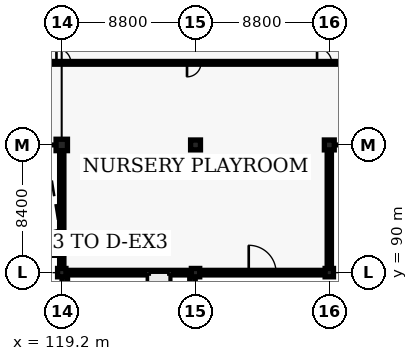
"""IFC4 building model, lengths in metres.
Left out: names, types, materials, properties, quantities, classifications, styles, units other than length and angle.
Written with IfcOpenShell. Run it as: python <this file> out.ifc"""

import sys

from ifc_helpers import new_model, si_unit, direction, frame, frame_2d, origin, origin_2d, place, context, subcontext, project, spatial, rectangle, circle, extrude, element, fill, save


model = new_model("IFC4")
c1 = context("Model", 3, precision=1e-05, world=origin(), true_north=direction((0.0, 1.0)))
c2 = subcontext(c1, "Body", "Model", "MODEL_VIEW")
j1 = project(units=[si_unit("LENGTHUNIT", "METRE"), si_unit("PLANEANGLEUNIT", "RADIAN")], contexts=[c1])
p1 = place(None, origin())
s1 = spatial("IfcSite", under=j1, at=p1, CompositionType="ELEMENT")
p2 = place(p1, origin())
s2 = spatial("IfcBuilding", under=s1, at=p2, CompositionType="ELEMENT")
p3 = place(p2, origin())
s3 = spatial("IfcBuildingStorey", under=s2, at=p3, CompositionType="ELEMENT", Elevation=0.0)
p4 = place(p3, frame((119.2, 90.0, 0.0), z_axis=(0.0, 0.0, 1.0), x_axis=(1.0, 0.0, 0.0)))
e1 = element("IfcColumn", 1, at=p4, inside=s3, PredefinedType="PILASTER", context=c2, shape_type="SweptSolid", body=[
    extrude(circle(Radius=0.275, at=origin_2d()), origin(), (0.0, 0.0, 1.0), 4.8),
])
p5 = place(p3, frame((119.2, 98.4, 0.0), z_axis=(0.0, 0.0, 1.0), x_axis=(1.0, 0.0, 0.0)))
e2 = element("IfcColumn", 2, at=p5, inside=s3, PredefinedType="COLUMN", context=c2, shape_type="SweptSolid", body=[
    extrude(rectangle(XDim=0.75, YDim=0.75, at=origin_2d()), origin(), (0.0, 0.0, 1.0), 4.8),
])
p6 = place(p3, frame((128.0, 90.0, 0.0), z_axis=(0.0, 0.0, 1.0), x_axis=(1.0, 0.0, 0.0)))
e3 = element("IfcColumn", 3, at=p6, inside=s3, PredefinedType="PILASTER", context=c2, shape_type="SweptSolid", body=[
    extrude(circle(Radius=0.275, at=origin_2d()), origin(), (0.0, 0.0, 1.0), 4.8),
])
p7 = place(p3, frame((128.0, 98.4, 0.0), z_axis=(0.0, 0.0, 1.0), x_axis=(1.0, 0.0, 0.0)))
e4 = element("IfcColumn", 4, at=p7, inside=s3, PredefinedType="COLUMN", context=c2, shape_type="SweptSolid", body=[
    extrude(rectangle(XDim=0.65, YDim=0.65, at=origin_2d()), origin(), (0.0, 0.0, 1.0), 4.8),
])
p8 = place(p3, frame((136.8, 90.0, 0.0), z_axis=(0.0, 0.0, 1.0), x_axis=(1.0, 0.0, 0.0)))
e5 = element("IfcColumn", 5, at=p8, inside=s3, PredefinedType="PILASTER", context=c2, shape_type="SweptSolid", body=[
    extrude(circle(Radius=0.275, at=origin_2d()), origin(), (0.0, 0.0, 1.0), 4.8),
])
p9 = place(p3, frame((136.8, 98.4, 0.0), z_axis=(0.0, 0.0, 1.0), x_axis=(1.0, 0.0, 0.0)))
e6 = element("IfcColumn", 6, at=p9, inside=s3, PredefinedType="COLUMN", context=c2, shape_type="SweptSolid", body=[
    extrude(rectangle(XDim=0.65, YDim=0.65, at=origin_2d()), origin(), (0.0, 0.0, 1.0), 4.8),
])
p10 = place(p3, frame((119.3, 90.0, 0.0), z_axis=(0.0, 0.0, 1.0), x_axis=(1.0, 0.0, 0.0)))
e7 = element("IfcWall", 7, at=p10, inside=s3, PredefinedType="SOLIDWALL", context=c2, shape_type="SweptSolid", body=[
    extrude(rectangle(XDim=8.6, YDim=0.3, at=frame_2d((4.3, 0.0))), origin(), (0.0, 0.0, 1.0), 3.675),
])
p11 = place(p3, frame((128.1, 90.0, 0.0), z_axis=(0.0, 0.0, 1.0), x_axis=(1.0, 0.0, 0.0)))
e8 = element("IfcWall", 8, at=p11, inside=s3, PredefinedType="SOLIDWALL", context=c2, shape_type="SweptSolid", body=[
    extrude(rectangle(XDim=8.6, YDim=0.3, at=frame_2d((4.3, 0.0))), origin(), (0.0, 0.0, 1.0), 3.675),
])
p12 = place(p11, frame((3.4, 0.0, 0.0)))
e9 = element("IfcOpeningElement", 9, at=p12, cuts=e8, PredefinedType="OPENING", context=c2, shape_type="SweptSolid", body=[
    extrude(rectangle(XDim=1.8, YDim=2.25, at=frame_2d((0.9, 1.125))), frame((0.0, 0.16, 0.0), z_axis=(0.0, -1.0, 0.0), x_axis=(1.0, 0.0, 0.0)), (0.0, 0.0, 1.0), 0.32),
])
p13 = place(p3, frame((119.2, 90.15, 0.0), z_axis=(0.0, 0.0, 1.0), x_axis=(0.0, 1.0, 0.0)))
e10 = element("IfcWall", 10, at=p13, inside=s3, PredefinedType="SOLIDWALL", context=c2, shape_type="SweptSolid", body=[
    extrude(rectangle(XDim=8.1, YDim=0.28, at=frame_2d((4.05, 0.0))), origin(), (0.0, 0.0, 1.0), 3.775),
])
p14 = place(p13, frame((0.9, 0.0, 0.0)))
e11 = element("IfcOpeningElement", 11, at=p14, cuts=e10, PredefinedType="OPENING", context=c2, shape_type="SweptSolid", body=[
    extrude(rectangle(XDim=1.8, YDim=2.25, at=frame_2d((0.9, 1.125))), frame((0.0, 0.15, 0.0), z_axis=(0.0, -1.0, 0.0), x_axis=(1.0, 0.0, 0.0)), (0.0, 0.0, 1.0), 0.3),
])
p15 = place(p3, frame((136.8, 90.15, 0.0), z_axis=(0.0, 0.0, 1.0), x_axis=(0.0, 1.0, 0.0)))
e12 = element("IfcWall", 12, at=p15, inside=s3, PredefinedType="SOLIDWALL", context=c2, shape_type="SweptSolid", body=[
    extrude(rectangle(XDim=8.1, YDim=0.28, at=frame_2d((4.05, 0.0))), origin(), (0.0, 0.0, 1.0), 3.775),
])
for number, where, z_axis, x_axis in (
    (13, (119.4, 88.85, 0.0), (0.0, 0.0, 1.0), (0.0, 1.0, 0.0)),
    (14, (127.8, 88.85, 0.0), (0.0, 0.0, 1.0), (0.0, 1.0, 0.0)),
):
    element("IfcWall", number, at=place(p3, frame(where, z_axis=z_axis, x_axis=x_axis)), inside=s3, PredefinedType="SOLIDWALL", context=c2, shape_type="SweptSolid", body=[
        extrude(rectangle(XDim=1.07, YDim=0.36, at=frame_2d((0.535, 0.0))), origin(), (0.0, 0.0, 1.0), 4.3),
    ])
p16 = place(p3, frame((42.15, 103.8, 0.0), z_axis=(0.0, 0.0, 1.0), x_axis=(1.0, 0.0, 0.0)))
e15 = element("IfcWall", 15, at=p16, inside=s3, PredefinedType="PARTITIONING", context=c2, shape_type="SweptSolid", body=[
    extrude(rectangle(XDim=102.9, YDim=0.18, at=frame_2d((51.45, 0.0))), origin(), (0.0, 0.0, 1.0), 3.775),
])
p17 = place(p16, frame((7.735, 0.0, 0.0)))
e16 = element("IfcOpeningElement", 16, at=p17, cuts=e15, PredefinedType="OPENING", context=c2, shape_type="SweptSolid", body=[
    extrude(rectangle(XDim=1.68, YDim=2.26, at=frame_2d((0.84, 1.13))), frame((0.0, 0.1, 0.0), z_axis=(0.0, -1.0, 0.0), x_axis=(1.0, 0.0, 0.0)), (0.0, 0.0, 1.0), 0.2),
])
p18 = place(p16, frame((16.63, 0.0, 0.0)))
e17 = element("IfcOpeningElement", 17, at=p18, cuts=e15, PredefinedType="OPENING", context=c2, shape_type="SweptSolid", body=[
    extrude(rectangle(XDim=1.04, YDim=2.08, at=frame_2d((0.52, 1.04))), frame((0.0, 0.1, 0.0), z_axis=(0.0, -1.0, 0.0), x_axis=(1.0, 0.0, 0.0)), (0.0, 0.0, 1.0), 0.2),
])
p19 = place(p16, frame((24.725, 0.0, 0.0)))
e18 = element("IfcOpeningElement", 18, at=p19, cuts=e15, PredefinedType="OPENING", context=c2, shape_type="SweptSolid", body=[
    extrude(rectangle(XDim=2.0, YDim=2.3, at=frame_2d((1.0, 1.15))), frame((0.0, 0.1, 0.0), z_axis=(0.0, -1.0, 0.0), x_axis=(1.0, 0.0, 0.0)), (0.0, 0.0, 1.0), 0.2),
])
p20 = place(p16, frame((33.375, 0.0, 0.0)))
e19 = element("IfcOpeningElement", 19, at=p20, cuts=e15, PredefinedType="OPENING", context=c2, shape_type="SweptSolid", body=[
    extrude(rectangle(XDim=1.85, YDim=2.22, at=frame_2d((0.925, 1.11))), frame((0.0, 0.1, 0.0), z_axis=(0.0, -1.0, 0.0), x_axis=(1.0, 0.0, 0.0)), (0.0, 0.0, 1.0), 0.2),
])
p21 = place(p16, frame((42.315, 0.0, 0.0)))
e20 = element("IfcOpeningElement", 20, at=p21, cuts=e15, PredefinedType="OPENING", context=c2, shape_type="SweptSolid", body=[
    extrude(rectangle(XDim=1.12, YDim=2.16, at=frame_2d((0.56, 1.08))), frame((0.0, 0.1, 0.0), z_axis=(0.0, -1.0, 0.0), x_axis=(1.0, 0.0, 0.0)), (0.0, 0.0, 1.0), 0.2),
])
p22 = place(p16, frame((50.92, 0.0, 0.0)))
e21 = element("IfcOpeningElement", 21, at=p22, cuts=e15, PredefinedType="OPENING", context=c2, shape_type="SweptSolid", body=[
    extrude(rectangle(XDim=1.06, YDim=2.16, at=frame_2d((0.53, 1.08))), frame((0.0, 0.1, 0.0), z_axis=(0.0, -1.0, 0.0), x_axis=(1.0, 0.0, 0.0)), (0.0, 0.0, 1.0), 0.2),
])
p23 = place(p16, frame((59.525, 0.0, 0.0)))
e22 = element("IfcOpeningElement", 22, at=p23, cuts=e15, PredefinedType="OPENING", context=c2, shape_type="SweptSolid", body=[
    extrude(rectangle(XDim=1.0, YDim=2.14, at=frame_2d((0.5, 1.07))), frame((0.0, 0.1, 0.0), z_axis=(0.0, -1.0, 0.0), x_axis=(1.0, 0.0, 0.0)), (0.0, 0.0, 1.0), 0.2),
])
p24 = place(p16, frame((68.11, 0.0, 0.0)))
e23 = element("IfcOpeningElement", 23, at=p24, cuts=e15, PredefinedType="OPENING", context=c2, shape_type="SweptSolid", body=[
    extrude(rectangle(XDim=0.98, YDim=2.12, at=frame_2d((0.49, 1.06))), frame((0.0, 0.1, 0.0), z_axis=(0.0, -1.0, 0.0), x_axis=(1.0, 0.0, 0.0)), (0.0, 0.0, 1.0), 0.2),
])
p25 = place(p16, frame((76.7, 0.0, 0.0)))
e24 = element("IfcOpeningElement", 24, at=p25, cuts=e15, PredefinedType="OPENING", context=c2, shape_type="SweptSolid", body=[
    extrude(rectangle(XDim=0.95, YDim=2.12, at=frame_2d((0.475, 1.06))), frame((0.0, 0.1, 0.0), z_axis=(0.0, -1.0, 0.0), x_axis=(1.0, 0.0, 0.0)), (0.0, 0.0, 1.0), 0.2),
])
p26 = place(p16, frame((85.29, 0.0, 0.0)))
e25 = element("IfcOpeningElement", 25, at=p26, cuts=e15, PredefinedType="OPENING", context=c2, shape_type="SweptSolid", body=[
    extrude(rectangle(XDim=0.92, YDim=2.1, at=frame_2d((0.46, 1.05))), frame((0.0, 0.1, 0.0), z_axis=(0.0, -1.0, 0.0), x_axis=(1.0, 0.0, 0.0)), (0.0, 0.0, 1.0), 0.2),
])
p27 = place(p16, frame((93.845, 0.0, 0.0)))
e26 = element("IfcOpeningElement", 26, at=p27, cuts=e15, PredefinedType="OPENING", context=c2, shape_type="SweptSolid", body=[
    extrude(rectangle(XDim=0.96, YDim=2.08, at=frame_2d((0.48, 1.04))), frame((0.0, 0.1, 0.0), z_axis=(0.0, -1.0, 0.0), x_axis=(1.0, 0.0, 0.0)), (0.0, 0.0, 1.0), 0.2),
])
p28 = place(p14, origin())
e27 = element("IfcDoor", 27, at=p28, inside=s3, OperationType="DOUBLE_DOOR_SINGLE_SWING", PredefinedType="DOOR", context=c2, shape_type="SweptSolid", body=[
    extrude(rectangle(XDim=1.8, YDim=2.25, at=frame_2d((0.9, 1.125))), frame((0.0, 0.025, 0.0), z_axis=(0.0, -1.0, 0.0), x_axis=(1.0, 0.0, 0.0)), (0.0, 0.0, 1.0), 0.05),
])
fill(e11, e27)
p29 = place(p12, origin())
e28 = element("IfcDoor", 28, at=p29, inside=s3, OperationType="DOUBLE_DOOR_SINGLE_SWING", PredefinedType="DOOR", context=c2, shape_type="SweptSolid", body=[
    extrude(rectangle(XDim=1.8, YDim=2.25, at=frame_2d((0.9, 1.125))), frame((0.0, 0.025, 0.0), z_axis=(0.0, -1.0, 0.0), x_axis=(1.0, 0.0, 0.0)), (0.0, 0.0, 1.0), 0.05),
])
fill(e9, e28)
p30 = place(p25, origin())
e29 = element("IfcDoor", 29, at=p30, inside=s3, OperationType="SINGLE_SWING_LEFT", PredefinedType="DOOR", context=c2, shape_type="SweptSolid", body=[
    extrude(rectangle(XDim=0.95, YDim=2.12, at=frame_2d((0.475, 1.06))), frame((0.0, 0.025, 0.0), z_axis=(0.0, -1.0, 0.0), x_axis=(1.0, 0.0, 0.0)), (0.0, 0.0, 1.0), 0.05),
])
fill(e24, e29)
p31 = place(p26, origin())
e30 = element("IfcDoor", 30, at=p31, inside=s3, OperationType="SINGLE_SWING_RIGHT", PredefinedType="DOOR", context=c2, shape_type="SweptSolid", body=[
    extrude(rectangle(XDim=0.92, YDim=2.1, at=frame_2d((0.46, 1.05))), frame((0.0, 0.025, 0.0), z_axis=(0.0, -1.0, 0.0), x_axis=(1.0, 0.0, 0.0)), (0.0, 0.0, 1.0), 0.05),
])
fill(e25, e30)
p32 = place(p27, origin())
e31 = element("IfcDoor", 31, at=p32, inside=s3, OperationType="SINGLE_SWING_LEFT", PredefinedType="DOOR", context=c2, shape_type="SweptSolid", body=[
    extrude(rectangle(XDim=0.96, YDim=2.08, at=frame_2d((0.48, 1.04))), frame((0.0, 0.025, 0.0), z_axis=(0.0, -1.0, 0.0), x_axis=(1.0, 0.0, 0.0)), (0.0, 0.0, 1.0), 0.05),
])
fill(e26, e31)
save(model, sys.argv[1])
